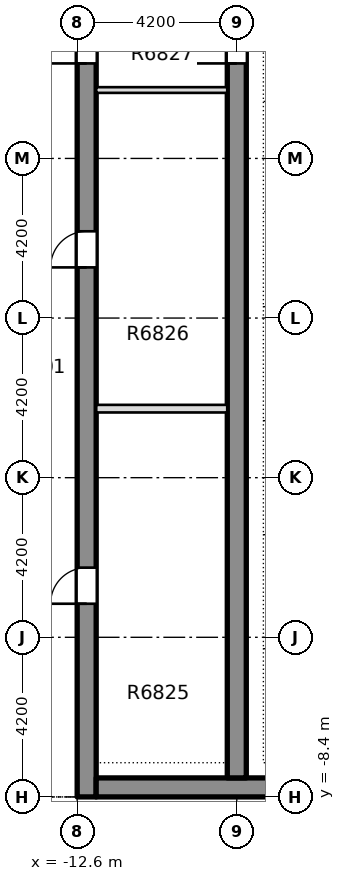
"""IFC4 building model, lengths in metres.
Left out: names, types, materials, properties, quantities, classifications, styles, units other than length and angle.
Written with IfcOpenShell. Run it as: python <this file> out.ifc"""

import sys

from ifc_helpers import new_model, si_unit, direction, frame, frame_2d, origin, place, context, subcontext, project, spatial, rectangle, extrude, element, fill, save


model = new_model("IFC4")
c1 = context("Model", 3, precision=1e-05, world=origin(), true_north=direction((0.0, 1.0)))
c2 = subcontext(c1, "Body", "Model", "MODEL_VIEW")
j1 = project(units=[si_unit("LENGTHUNIT", "METRE"), si_unit("PLANEANGLEUNIT", "RADIAN")], contexts=[c1])
p1 = place(None, origin())
s1 = spatial("IfcSite", under=j1, at=p1, CompositionType="ELEMENT")
p2 = place(p1, origin())
s2 = spatial("IfcBuilding", under=s1, at=p2, CompositionType="ELEMENT")
p3 = place(p2, frame((0.0, 0.0, 257.95)))
s3 = spatial("IfcBuildingStorey", under=s2, at=p3, CompositionType="ELEMENT", Elevation=257.95)
p4 = place(p3, frame((-12.35, -8.4, -0.4), z_axis=(0.0, 0.0, 1.0), x_axis=(0.0, 1.0, 0.0)))
e1 = element("IfcWall", 1, at=p4, inside=s3, PredefinedType="SHEAR", context=c2, shape_type="SweptSolid", body=[
    extrude(rectangle(XDim=30.15, YDim=0.5, at=frame_2d((15.075, 0.0))), origin(), (0.0, 0.0, 1.0), 3.45),
])
p5 = place(p4, frame((5.083, 0.0, 0.4)))
e2 = element("IfcOpeningElement", 2, at=p5, cuts=e1, PredefinedType="OPENING", context=c2, shape_type="SweptSolid", body=[
    extrude(rectangle(XDim=0.95, YDim=2.1, at=frame_2d((0.475, 1.05))), frame((0.0, 0.26, 0.0), z_axis=(0.0, -1.0, 0.0), x_axis=(1.0, 0.0, 0.0)), (0.0, 0.0, 1.0), 0.52),
])
p6 = place(p4, frame((13.933, 0.0, 0.4)))
e3 = element("IfcOpeningElement", 3, at=p6, cuts=e1, PredefinedType="OPENING", context=c2, shape_type="SweptSolid", body=[
    extrude(rectangle(XDim=0.95, YDim=2.1, at=frame_2d((0.475, 1.05))), frame((0.0, 0.26, 0.0), z_axis=(0.0, -1.0, 0.0), x_axis=(1.0, 0.0, 0.0)), (0.0, 0.0, 1.0), 0.52),
])
p7 = place(p4, frame((22.719, 0.0, 0.4)))
e4 = element("IfcOpeningElement", 4, at=p7, cuts=e1, PredefinedType="OPENING", context=c2, shape_type="SweptSolid", body=[
    extrude(rectangle(XDim=0.95, YDim=2.1, at=frame_2d((0.475, 1.05))), frame((0.0, 0.26, 0.0), z_axis=(0.0, -1.0, 0.0), x_axis=(1.0, 0.0, 0.0)), (0.0, 0.0, 1.0), 0.52),
])
p8 = place(p4, frame((25.506, 0.0, 0.4)))
e5 = element("IfcOpeningElement", 5, at=p8, cuts=e1, PredefinedType="OPENING", context=c2, shape_type="SweptSolid", body=[
    extrude(rectangle(XDim=0.95, YDim=2.1, at=frame_2d((0.475, 1.05))), frame((0.0, 0.26, 0.0), z_axis=(0.0, -1.0, 0.0), x_axis=(1.0, 0.0, 0.0)), (0.0, 0.0, 1.0), 0.52),
])
p9 = place(p4, frame((27.537, 0.0, 0.4)))
e6 = element("IfcOpeningElement", 6, at=p9, cuts=e1, PredefinedType="OPENING", context=c2, shape_type="SweptSolid", body=[
    extrude(rectangle(XDim=0.95, YDim=2.1, at=frame_2d((0.475, 1.05))), frame((0.0, 0.26, 0.0), z_axis=(0.0, -1.0, 0.0), x_axis=(1.0, 0.0, 0.0)), (0.0, 0.0, 1.0), 0.52),
])
p10 = place(p4, frame((19.3, 0.0, 0.4)))
e7 = element("IfcOpeningElement", 7, at=p10, cuts=e1, PredefinedType="OPENING", context=c2, shape_type="SweptSolid", body=[
    extrude(rectangle(XDim=1.2, YDim=2.1, at=frame_2d((0.6, 1.05))), frame((0.0, 0.26, 0.0), z_axis=(0.0, -1.0, 0.0), x_axis=(1.0, 0.0, 0.0)), (0.0, 0.0, 1.0), 0.52),
])
p11 = place(p3, frame((-12.1, -8.15, -0.4), z_axis=(0.0, 0.0, 1.0), x_axis=(1.0, 0.0, 0.0)))
e8 = element("IfcWall", 8, at=p11, inside=s3, PredefinedType="SHEAR", context=c2, shape_type="SweptSolid", body=[
    extrude(rectangle(XDim=24.2, YDim=0.5, at=frame_2d((12.1, 0.0))), origin(), (0.0, 0.0, 1.0), 3.45),
])
p12 = place(p11, frame((7.35, 0.0, 0.4)))
e9 = element("IfcOpeningElement", 9, at=p12, cuts=e8, PredefinedType="OPENING", context=c2, shape_type="SweptSolid", body=[
    extrude(rectangle(XDim=1.8, YDim=2.1, at=frame_2d((0.9, 1.05))), frame((0.0, 0.26, 0.0), z_axis=(0.0, -1.0, 0.0), x_axis=(1.0, 0.0, 0.0)), (0.0, 0.0, 1.0), 0.52),
])
p13 = place(p11, frame((15.05, 0.0, 0.4)))
e10 = element("IfcOpeningElement", 10, at=p13, cuts=e8, PredefinedType="OPENING", context=c2, shape_type="SweptSolid", body=[
    extrude(rectangle(XDim=1.8, YDim=2.1, at=frame_2d((0.9, 1.05))), frame((0.0, 0.26, 0.0), z_axis=(0.0, -1.0, 0.0), x_axis=(1.0, 0.0, 0.0)), (0.0, 0.0, 1.0), 0.52),
])
p14 = place(p3, frame((-8.4, -7.9, -0.4), z_axis=(0.0, 0.0, 1.0), x_axis=(0.0, 1.0, 0.0)))
e11 = element("IfcWall", 11, at=p14, inside=s3, PredefinedType="SHEAR", context=c2, shape_type="SweptSolid", body=[
    extrude(rectangle(XDim=29.15, YDim=0.5, at=frame_2d((14.575, 0.0))), origin(), (0.0, 0.0, 1.0), 3.45),
])
p15 = place(p14, frame((18.8, 0.0, 0.4)))
e12 = element("IfcOpeningElement", 12, at=p15, cuts=e11, PredefinedType="OPENING", context=c2, shape_type="SweptSolid", body=[
    extrude(rectangle(XDim=1.2, YDim=2.1, at=frame_2d((0.6, 1.05))), frame((0.0, 0.26, 0.0), z_axis=(0.0, -1.0, 0.0), x_axis=(1.0, 0.0, 0.0)), (0.0, 0.0, 1.0), 0.52),
])
p16 = place(p3, frame((-12.099, 1.816, 0.0), z_axis=(0.0, 0.0, 1.0), x_axis=(1.0, 0.0, 0.0)))
e13 = element("IfcWall", 13, at=p16, inside=s3, PredefinedType="PARTITIONING", context=c2, shape_type="SweptSolid", body=[
    extrude(rectangle(XDim=3.448, YDim=0.2, at=frame_2d((1.724, 0.0))), origin(), (0.0, 0.0, 1.0), 3.05),
])
p17 = place(p3, frame((-12.099, 10.2, 0.0), z_axis=(0.0, 0.0, 1.0), x_axis=(1.0, 0.0, 0.0)))
e14 = element("IfcWall", 14, at=p17, inside=s3, PredefinedType="PARTITIONING", context=c2, shape_type="SweptSolid", body=[
    extrude(rectangle(XDim=3.448, YDim=0.15, at=frame_2d((1.724, 0.0))), origin(), (0.0, 0.0, 1.0), 3.05),
])
p18 = place(p5, origin())
e15 = element("IfcDoor", 15, at=p18, inside=s3, OperationType="SINGLE_SWING_LEFT", PredefinedType="DOOR", context=c2, shape_type="SweptSolid", body=[
    extrude(rectangle(XDim=0.95, YDim=2.1, at=frame_2d((0.475, 1.05))), frame((0.0, 0.025, 0.0), z_axis=(0.0, -1.0, 0.0), x_axis=(1.0, 0.0, 0.0)), (0.0, 0.0, 1.0), 0.05),
])
fill(e2, e15)
p19 = place(p6, origin())
e16 = element("IfcDoor", 16, at=p19, inside=s3, OperationType="SINGLE_SWING_LEFT", PredefinedType="DOOR", context=c2, shape_type="SweptSolid", body=[
    extrude(rectangle(XDim=0.95, YDim=2.1, at=frame_2d((0.475, 1.05))), frame((0.0, 0.025, 0.0), z_axis=(0.0, -1.0, 0.0), x_axis=(1.0, 0.0, 0.0)), (0.0, 0.0, 1.0), 0.05),
])
fill(e3, e16)
p20 = place(p10, origin())
e17 = element("IfcDoor", 17, at=p20, inside=s3, OperationType="SINGLE_SWING_LEFT", PredefinedType="DOOR", context=c2, shape_type="SweptSolid", body=[
    extrude(rectangle(XDim=1.2, YDim=2.1, at=frame_2d((0.6, 1.05))), frame((0.0, 0.025, 0.0), z_axis=(0.0, -1.0, 0.0), x_axis=(1.0, 0.0, 0.0)), (0.0, 0.0, 1.0), 0.05),
])
fill(e7, e17)
p21 = place(p15, origin())
e18 = element("IfcDoor", 18, at=p21, inside=s3, OperationType="SINGLE_SWING_LEFT", PredefinedType="DOOR", context=c2, shape_type="SweptSolid", body=[
    extrude(rectangle(XDim=1.2, YDim=2.1, at=frame_2d((0.6, 1.05))), frame((0.0, 0.025, 0.0), z_axis=(0.0, -1.0, 0.0), x_axis=(1.0, 0.0, 0.0)), (0.0, 0.0, 1.0), 0.05),
])
fill(e12, e18)
save(model, sys.argv[1])
